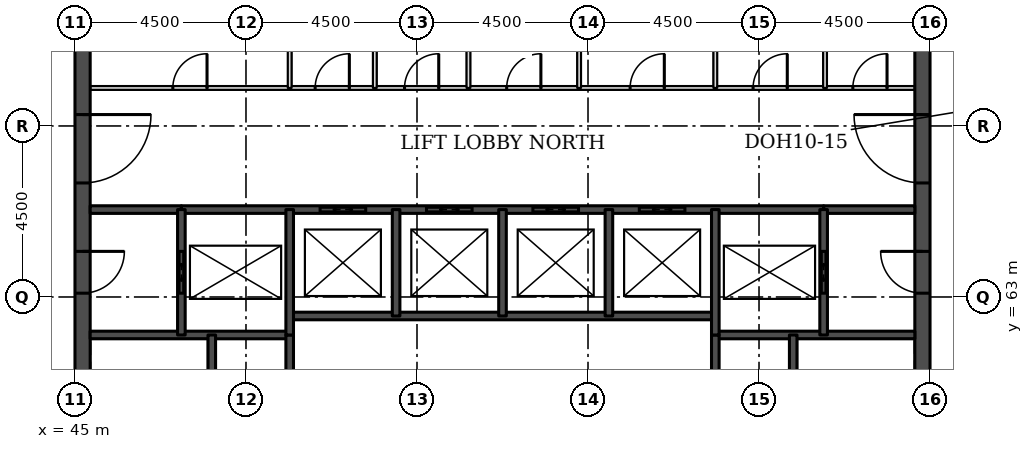
"""IFC4 building model, lengths in metres.
Left out: names, types, materials, properties, quantities, classifications, styles, units other than length and angle.
Written with IfcOpenShell. Run it as: python <this file> out.ifc"""

import sys

from ifc_helpers import new_model, si_unit, direction, frame, frame_2d, origin, place, context, subcontext, project, spatial, rectangle, extrude, element, fill, save


model = new_model("IFC4")
c1 = context("Model", 3, precision=1e-05, world=origin(), true_north=direction((0.0, 1.0)))
c2 = subcontext(c1, "Body", "Model", "MODEL_VIEW")
j1 = project(units=[si_unit("LENGTHUNIT", "METRE"), si_unit("PLANEANGLEUNIT", "RADIAN")], contexts=[c1])
p1 = place(None, origin())
s1 = spatial("IfcSite", under=j1, at=p1, CompositionType="ELEMENT")
p2 = place(p1, origin())
s2 = spatial("IfcBuilding", under=s1, at=p2, CompositionType="ELEMENT")
p3 = place(p2, frame((0.0, 0.0, 226.7)))
s3 = spatial("IfcBuildingStorey", under=s2, at=p3, CompositionType="ELEMENT", Elevation=226.7)
p4 = place(p3, frame((45.2, 49.5, 0.0), z_axis=(0.0, 0.0, 1.0), x_axis=(0.0, 1.0, 0.0)))
e1 = element("IfcWall", 1, at=p4, inside=s3, PredefinedType="SHEAR", context=c2, shape_type="SweptSolid", body=[
    extrude(rectangle(XDim=22.5, YDim=0.4, at=frame_2d((11.25, 0.0))), origin(), (0.0, 0.0, 1.0), 3.7),
])
p5 = place(p4, frame((4.2, 0.0, 0.0)))
e2 = element("IfcOpeningElement", 2, at=p5, cuts=e1, PredefinedType="OPENING", context=c2, shape_type="SweptSolid", body=[
    extrude(rectangle(XDim=1.8, YDim=2.1, at=frame_2d((0.9, 1.05))), frame((0.0, 0.21, 0.0), z_axis=(0.0, -1.0, 0.0), x_axis=(1.0, 0.0, 0.0)), (0.0, 0.0, 1.0), 0.42),
])
p6 = place(p4, frame((6.9, 0.0, 0.0)))
e3 = element("IfcOpeningElement", 3, at=p6, cuts=e1, PredefinedType="OPENING", context=c2, shape_type="SweptSolid", body=[
    extrude(rectangle(XDim=1.1, YDim=2.1, at=frame_2d((0.55, 1.05))), frame((0.0, 0.21, 0.0), z_axis=(0.0, -1.0, 0.0), x_axis=(1.0, 0.0, 0.0)), (0.0, 0.0, 1.0), 0.42),
])
p7 = place(p4, frame((13.6, 0.0, 0.0)))
e4 = element("IfcOpeningElement", 4, at=p7, cuts=e1, PredefinedType="OPENING", context=c2, shape_type="SweptSolid", body=[
    extrude(rectangle(XDim=1.1, YDim=2.1, at=frame_2d((0.55, 1.05))), frame((0.0, 0.21, 0.0), z_axis=(0.0, -1.0, 0.0), x_axis=(1.0, 0.0, 0.0)), (0.0, 0.0, 1.0), 0.42),
])
p8 = place(p4, frame((16.5, 0.0, 0.0)))
e5 = element("IfcOpeningElement", 5, at=p8, cuts=e1, PredefinedType="OPENING", context=c2, shape_type="SweptSolid", body=[
    extrude(rectangle(XDim=1.8, YDim=2.1, at=frame_2d((0.9, 1.05))), frame((0.0, 0.21, 0.0), z_axis=(0.0, -1.0, 0.0), x_axis=(1.0, 0.0, 0.0)), (0.0, 0.0, 1.0), 0.42),
])
p9 = place(p3, frame((67.3, 49.5, 0.0), z_axis=(0.0, 0.0, 1.0), x_axis=(0.0, 1.0, 0.0)))
e6 = element("IfcWall", 6, at=p9, inside=s3, PredefinedType="SHEAR", context=c2, shape_type="SweptSolid", body=[
    extrude(rectangle(XDim=22.5, YDim=0.4, at=frame_2d((11.25, 0.0))), origin(), (0.0, 0.0, 1.0), 3.7),
])
p10 = place(p9, frame((4.2, 0.0, 0.0)))
e7 = element("IfcOpeningElement", 7, at=p10, cuts=e6, PredefinedType="OPENING", context=c2, shape_type="SweptSolid", body=[
    extrude(rectangle(XDim=1.8, YDim=2.1, at=frame_2d((0.9, 1.05))), frame((0.0, 0.21, 0.0), z_axis=(0.0, -1.0, 0.0), x_axis=(1.0, 0.0, 0.0)), (0.0, 0.0, 1.0), 0.42),
])
p11 = place(p9, frame((6.9, 0.0, 0.0)))
e8 = element("IfcOpeningElement", 8, at=p11, cuts=e6, PredefinedType="OPENING", context=c2, shape_type="SweptSolid", body=[
    extrude(rectangle(XDim=1.1, YDim=2.1, at=frame_2d((0.55, 1.05))), frame((0.0, 0.21, 0.0), z_axis=(0.0, -1.0, 0.0), x_axis=(1.0, 0.0, 0.0)), (0.0, 0.0, 1.0), 0.42),
])
p12 = place(p9, frame((13.6, 0.0, 0.0)))
e9 = element("IfcOpeningElement", 9, at=p12, cuts=e6, PredefinedType="OPENING", context=c2, shape_type="SweptSolid", body=[
    extrude(rectangle(XDim=1.1, YDim=2.1, at=frame_2d((0.55, 1.05))), frame((0.0, 0.21, 0.0), z_axis=(0.0, -1.0, 0.0), x_axis=(1.0, 0.0, 0.0)), (0.0, 0.0, 1.0), 0.42),
])
p13 = place(p9, frame((16.5, 0.0, 0.0)))
e10 = element("IfcOpeningElement", 10, at=p13, cuts=e6, PredefinedType="OPENING", context=c2, shape_type="SweptSolid", body=[
    extrude(rectangle(XDim=1.8, YDim=2.1, at=frame_2d((0.9, 1.05))), frame((0.0, 0.21, 0.0), z_axis=(0.0, -1.0, 0.0), x_axis=(1.0, 0.0, 0.0)), (0.0, 0.0, 1.0), 0.42),
])
for number, where, z_axis, x_axis in (
    (11, (45.4, 62.0, 0.0), (0.0, 0.0, 1.0), (1.0, 0.0, 0.0)),
    (12, (61.85, 62.0, 0.0), (0.0, 0.0, 1.0), (1.0, 0.0, 0.0)),
):
    element("IfcWall", number, at=place(p3, frame(where, z_axis=z_axis, x_axis=x_axis)), inside=s3, PredefinedType="SOLIDWALL", context=c2, shape_type="SweptSolid", body=[
        extrude(rectangle(XDim=5.25, YDim=0.2, at=frame_2d((2.625, 0.0))), origin(), (0.0, 0.0, 1.0), 3.55),
    ])
p14 = place(p3, frame((50.65, 62.5, 0.0), z_axis=(0.0, 0.0, 1.0), x_axis=(1.0, 0.0, 0.0)))
e13 = element("IfcWall", 13, at=p14, inside=s3, PredefinedType="SOLIDWALL", context=c2, shape_type="SweptSolid", body=[
    extrude(rectangle(XDim=11.2, YDim=0.2, at=frame_2d((5.6, 0.0))), origin(), (0.0, 0.0, 1.0), 3.7),
])
for number, where, z_axis, x_axis in (
    (14, (45.4, 65.3, 0.0), (0.0, 0.0, 1.0), (1.0, 0.0, 0.0)),
    (15, (64.7, 65.3, 0.0), (0.0, 0.0, 1.0), (1.0, 0.0, 0.0)),
):
    element("IfcWall", number, at=place(p3, frame(where, z_axis=z_axis, x_axis=x_axis)), inside=s3, PredefinedType="SOLIDWALL", context=c2, shape_type="SweptSolid", body=[
        extrude(rectangle(XDim=2.4, YDim=0.2, at=frame_2d((1.2, 0.0))), origin(), (0.0, 0.0, 1.0), 3.55),
    ])
p15 = place(p3, frame((47.8, 65.3, 0.0), z_axis=(0.0, 0.0, 1.0), x_axis=(1.0, 0.0, 0.0)))
e16 = element("IfcWall", 16, at=p15, inside=s3, PredefinedType="SOLIDWALL", context=c2, shape_type="SweptSolid", body=[
    extrude(rectangle(XDim=16.9, YDim=0.2, at=frame_2d((8.45, 0.0))), origin(), (0.0, 0.0, 1.0), 3.55),
])
p16 = place(p15, frame((3.65, 0.0, 0.0)))
e17 = element("IfcOpeningElement", 17, at=p16, cuts=e16, PredefinedType="OPENING", context=c2, shape_type="SweptSolid", body=[
    extrude(rectangle(XDim=1.2, YDim=2.1, at=frame_2d((0.6, 1.05))), frame((0.0, 0.11, 0.0), z_axis=(0.0, -1.0, 0.0), x_axis=(1.0, 0.0, 0.0)), (0.0, 0.0, 1.0), 0.22),
])
p17 = place(p15, frame((6.45, 0.0, 0.0)))
e18 = element("IfcOpeningElement", 18, at=p17, cuts=e16, PredefinedType="OPENING", context=c2, shape_type="SweptSolid", body=[
    extrude(rectangle(XDim=1.2, YDim=2.1, at=frame_2d((0.6, 1.05))), frame((0.0, 0.11, 0.0), z_axis=(0.0, -1.0, 0.0), x_axis=(1.0, 0.0, 0.0)), (0.0, 0.0, 1.0), 0.22),
])
p18 = place(p15, frame((9.25, 0.0, 0.0)))
e19 = element("IfcOpeningElement", 19, at=p18, cuts=e16, PredefinedType="OPENING", context=c2, shape_type="SweptSolid", body=[
    extrude(rectangle(XDim=1.2, YDim=2.1, at=frame_2d((0.6, 1.05))), frame((0.0, 0.11, 0.0), z_axis=(0.0, -1.0, 0.0), x_axis=(1.0, 0.0, 0.0)), (0.0, 0.0, 1.0), 0.22),
])
p19 = place(p15, frame((12.05, 0.0, 0.0)))
e20 = element("IfcOpeningElement", 20, at=p19, cuts=e16, PredefinedType="OPENING", context=c2, shape_type="SweptSolid", body=[
    extrude(rectangle(XDim=1.2, YDim=2.1, at=frame_2d((0.6, 1.05))), frame((0.0, 0.11, 0.0), z_axis=(0.0, -1.0, 0.0), x_axis=(1.0, 0.0, 0.0)), (0.0, 0.0, 1.0), 0.22),
])
p20 = place(p3, frame((45.4, 68.5, 0.0), z_axis=(0.0, 0.0, 1.0), x_axis=(1.0, 0.0, 0.0)))
e21 = element("IfcWall", 21, at=p20, inside=s3, PredefinedType="PARTITIONING", context=c2, shape_type="SweptSolid", body=[
    extrude(rectangle(XDim=21.7, YDim=0.1, at=frame_2d((10.85, 0.0))), origin(), (0.0, 0.0, 1.0), 3.55),
])
p21 = place(p20, frame((20.069, 0.0, 0.0)))
e22 = element("IfcOpeningElement", 22, at=p21, cuts=e21, PredefinedType="OPENING", context=c2, shape_type="SweptSolid", body=[
    extrude(rectangle(XDim=0.9, YDim=2.1, at=frame_2d((0.45, 1.05))), frame((0.0, 0.06, 0.0), z_axis=(0.0, -1.0, 0.0), x_axis=(1.0, 0.0, 0.0)), (0.0, 0.0, 1.0), 0.12),
])
p22 = place(p20, frame((17.444, 0.0, 0.0)))
e23 = element("IfcOpeningElement", 23, at=p22, cuts=e21, PredefinedType="OPENING", context=c2, shape_type="SweptSolid", body=[
    extrude(rectangle(XDim=0.9, YDim=2.1, at=frame_2d((0.45, 1.05))), frame((0.0, 0.06, 0.0), z_axis=(0.0, -1.0, 0.0), x_axis=(1.0, 0.0, 0.0)), (0.0, 0.0, 1.0), 0.12),
])
p23 = place(p20, frame((2.175, 0.0, 0.0)))
e24 = element("IfcOpeningElement", 24, at=p23, cuts=e21, PredefinedType="OPENING", context=c2, shape_type="SweptSolid", body=[
    extrude(rectangle(XDim=0.9, YDim=2.1, at=frame_2d((0.45, 1.05))), frame((0.0, 0.06, 0.0), z_axis=(0.0, -1.0, 0.0), x_axis=(1.0, 0.0, 0.0)), (0.0, 0.0, 1.0), 0.12),
])
p24 = place(p20, frame((14.208, 0.0, 0.0)))
e25 = element("IfcOpeningElement", 25, at=p24, cuts=e21, PredefinedType="OPENING", context=c2, shape_type="SweptSolid", body=[
    extrude(rectangle(XDim=0.9, YDim=2.1, at=frame_2d((0.45, 1.05))), frame((0.0, 0.06, 0.0), z_axis=(0.0, -1.0, 0.0), x_axis=(1.0, 0.0, 0.0)), (0.0, 0.0, 1.0), 0.12),
])
p25 = place(p20, frame((10.96, 0.0, 0.0)))
e26 = element("IfcOpeningElement", 26, at=p25, cuts=e21, PredefinedType="OPENING", context=c2, shape_type="SweptSolid", body=[
    extrude(rectangle(XDim=0.9, YDim=2.1, at=frame_2d((0.45, 1.05))), frame((0.0, 0.06, 0.0), z_axis=(0.0, -1.0, 0.0), x_axis=(1.0, 0.0, 0.0)), (0.0, 0.0, 1.0), 0.12),
])
p26 = place(p20, frame((8.272, 0.0, 0.0)))
e27 = element("IfcOpeningElement", 27, at=p26, cuts=e21, PredefinedType="OPENING", context=c2, shape_type="SweptSolid", body=[
    extrude(rectangle(XDim=0.9, YDim=2.1, at=frame_2d((0.45, 1.05))), frame((0.0, 0.06, 0.0), z_axis=(0.0, -1.0, 0.0), x_axis=(1.0, 0.0, 0.0)), (0.0, 0.0, 1.0), 0.12),
])
p27 = place(p20, frame((5.92, 0.0, 0.0)))
e28 = element("IfcOpeningElement", 28, at=p27, cuts=e21, PredefinedType="OPENING", context=c2, shape_type="SweptSolid", body=[
    extrude(rectangle(XDim=0.9, YDim=2.1, at=frame_2d((0.45, 1.05))), frame((0.0, 0.06, 0.0), z_axis=(0.0, -1.0, 0.0), x_axis=(1.0, 0.0, 0.0)), (0.0, 0.0, 1.0), 0.12),
])
p28 = place(p3, frame((47.8, 62.0, 0.0), z_axis=(0.0, 0.0, 1.0), x_axis=(0.0, 1.0, 0.0)))
e29 = element("IfcWall", 29, at=p28, inside=s3, PredefinedType="SOLIDWALL", context=c2, shape_type="SweptSolid", body=[
    extrude(rectangle(XDim=3.3, YDim=0.2, at=frame_2d((1.65, 0.0))), origin(), (0.0, 0.0, 1.0), 3.55),
])
p29 = place(p28, frame((1.1, 0.0, 0.0)))
e30 = element("IfcOpeningElement", 30, at=p29, cuts=e29, PredefinedType="OPENING", context=c2, shape_type="SweptSolid", body=[
    extrude(rectangle(XDim=1.1, YDim=2.1, at=frame_2d((0.55, 1.05))), frame((0.0, 0.11, 0.0), z_axis=(0.0, -1.0, 0.0), x_axis=(1.0, 0.0, 0.0)), (0.0, 0.0, 1.0), 0.22),
])
p30 = place(p3, frame((48.6, 56.2, 0.0), z_axis=(0.0, 0.0, 1.0), x_axis=(0.0, 1.0, 0.0)))
e31 = element("IfcWall", 31, at=p30, inside=s3, PredefinedType="SOLIDWALL", context=c2, shape_type="SweptSolid", body=[
    extrude(rectangle(XDim=5.8, YDim=0.2, at=frame_2d((2.9, 0.0))), origin(), (0.0, 0.0, 1.0), 3.55),
])
p31 = place(p3, frame((50.65, 68.5, 0.0), z_axis=(0.0, 0.0, 1.0), x_axis=(0.0, 1.0, 0.0)))
e32 = element("IfcWall", 32, at=p31, inside=s3, PredefinedType="PARTITIONING", context=c2, shape_type="SweptSolid", body=[
    extrude(rectangle(XDim=3.1, YDim=0.1, at=frame_2d((1.55, 0.0))), origin(), (0.0, 0.0, 1.0), 3.55),
])
p32 = place(p3, frame((50.65, 59.0, 0.0), z_axis=(0.0, 0.0, 1.0), x_axis=(0.0, 1.0, 0.0)))
e33 = element("IfcWall", 33, at=p32, inside=s3, PredefinedType="SOLIDWALL", context=c2, shape_type="SweptSolid", body=[
    extrude(rectangle(XDim=3.0, YDim=0.2, at=frame_2d((1.5, 0.0))), origin(), (0.0, 0.0, 1.0), 3.7),
])
p33 = place(p3, frame((50.65, 62.0, 0.0), z_axis=(0.0, 0.0, 1.0), x_axis=(0.0, 1.0, 0.0)))
e34 = element("IfcWall", 34, at=p33, inside=s3, PredefinedType="SOLIDWALL", context=c2, shape_type="SweptSolid", body=[
    extrude(rectangle(XDim=3.3, YDim=0.2, at=frame_2d((1.65, 0.0))), origin(), (0.0, 0.0, 1.0), 3.55),
])
p34 = place(p3, frame((52.89, 68.5, 0.0), z_axis=(0.0, 0.0, 1.0), x_axis=(0.0, 1.0, 0.0)))
e35 = element("IfcWall", 35, at=p34, inside=s3, PredefinedType="PARTITIONING", context=c2, shape_type="SweptSolid", body=[
    extrude(rectangle(XDim=3.1, YDim=0.1, at=frame_2d((1.55, 0.0))), origin(), (0.0, 0.0, 1.0), 3.55),
])
p35 = place(p3, frame((53.45, 62.5, 0.0), z_axis=(0.0, 0.0, 1.0), x_axis=(0.0, 1.0, 0.0)))
e36 = element("IfcWall", 36, at=p35, inside=s3, PredefinedType="SOLIDWALL", context=c2, shape_type="SweptSolid", body=[
    extrude(rectangle(XDim=2.8, YDim=0.2, at=frame_2d((1.4, 0.0))), origin(), (0.0, 0.0, 1.0), 3.55),
])
p36 = place(p3, frame((55.354, 68.5, 0.0), z_axis=(0.0, 0.0, 1.0), x_axis=(0.0, 1.0, 0.0)))
e37 = element("IfcWall", 37, at=p36, inside=s3, PredefinedType="PARTITIONING", context=c2, shape_type="SweptSolid", body=[
    extrude(rectangle(XDim=3.1, YDim=0.1, at=frame_2d((1.55, 0.0))), origin(), (0.0, 0.0, 1.0), 3.55),
])
p37 = place(p3, frame((56.25, 62.5, 0.0), z_axis=(0.0, 0.0, 1.0), x_axis=(0.0, 1.0, 0.0)))
e38 = element("IfcWall", 38, at=p37, inside=s3, PredefinedType="SOLIDWALL", context=c2, shape_type="SweptSolid", body=[
    extrude(rectangle(XDim=2.8, YDim=0.2, at=frame_2d((1.4, 0.0))), origin(), (0.0, 0.0, 1.0), 3.55),
])
p38 = place(p3, frame((58.266, 68.5, 0.0), z_axis=(0.0, 0.0, 1.0), x_axis=(0.0, 1.0, 0.0)))
e39 = element("IfcWall", 39, at=p38, inside=s3, PredefinedType="PARTITIONING", context=c2, shape_type="SweptSolid", body=[
    extrude(rectangle(XDim=3.1, YDim=0.1, at=frame_2d((1.55, 0.0))), origin(), (0.0, 0.0, 1.0), 3.55),
])
p39 = place(p3, frame((59.05, 62.5, 0.0), z_axis=(0.0, 0.0, 1.0), x_axis=(0.0, 1.0, 0.0)))
e40 = element("IfcWall", 40, at=p39, inside=s3, PredefinedType="SOLIDWALL", context=c2, shape_type="SweptSolid", body=[
    extrude(rectangle(XDim=2.8, YDim=0.2, at=frame_2d((1.4, 0.0))), origin(), (0.0, 0.0, 1.0), 3.55),
])
p40 = place(p3, frame((61.85, 68.5, 0.0), z_axis=(0.0, 0.0, 1.0), x_axis=(0.0, 1.0, 0.0)))
e41 = element("IfcWall", 41, at=p40, inside=s3, PredefinedType="PARTITIONING", context=c2, shape_type="SweptSolid", body=[
    extrude(rectangle(XDim=3.1, YDim=0.1, at=frame_2d((1.55, 0.0))), origin(), (0.0, 0.0, 1.0), 3.55),
])
p41 = place(p3, frame((61.85, 59.0, 0.0), z_axis=(0.0, 0.0, 1.0), x_axis=(0.0, 1.0, 0.0)))
e42 = element("IfcWall", 42, at=p41, inside=s3, PredefinedType="SOLIDWALL", context=c2, shape_type="SweptSolid", body=[
    extrude(rectangle(XDim=3.0, YDim=0.2, at=frame_2d((1.5, 0.0))), origin(), (0.0, 0.0, 1.0), 3.7),
])
p42 = place(p3, frame((61.85, 62.0, 0.0), z_axis=(0.0, 0.0, 1.0), x_axis=(0.0, 1.0, 0.0)))
e43 = element("IfcWall", 43, at=p42, inside=s3, PredefinedType="SOLIDWALL", context=c2, shape_type="SweptSolid", body=[
    extrude(rectangle(XDim=3.3, YDim=0.2, at=frame_2d((1.65, 0.0))), origin(), (0.0, 0.0, 1.0), 3.55),
])
p43 = place(p3, frame((63.9, 56.2, 0.0), z_axis=(0.0, 0.0, 1.0), x_axis=(0.0, 1.0, 0.0)))
e44 = element("IfcWall", 44, at=p43, inside=s3, PredefinedType="SOLIDWALL", context=c2, shape_type="SweptSolid", body=[
    extrude(rectangle(XDim=5.8, YDim=0.2, at=frame_2d((2.9, 0.0))), origin(), (0.0, 0.0, 1.0), 3.55),
])
p44 = place(p3, frame((64.7, 62.0, 0.0), z_axis=(0.0, 0.0, 1.0), x_axis=(0.0, 1.0, 0.0)))
e45 = element("IfcWall", 45, at=p44, inside=s3, PredefinedType="SOLIDWALL", context=c2, shape_type="SweptSolid", body=[
    extrude(rectangle(XDim=3.3, YDim=0.2, at=frame_2d((1.65, 0.0))), origin(), (0.0, 0.0, 1.0), 3.55),
])
p45 = place(p44, frame((1.1, 0.0, 0.0)))
e46 = element("IfcOpeningElement", 46, at=p45, cuts=e45, PredefinedType="OPENING", context=c2, shape_type="SweptSolid", body=[
    extrude(rectangle(XDim=1.1, YDim=2.1, at=frame_2d((0.55, 1.05))), frame((0.0, 0.11, 0.0), z_axis=(0.0, -1.0, 0.0), x_axis=(1.0, 0.0, 0.0)), (0.0, 0.0, 1.0), 0.22),
])
p46 = place(p3, frame((64.738, 68.5, 0.0), z_axis=(0.0, 0.0, 1.0), x_axis=(0.0, 1.0, 0.0)))
e47 = element("IfcWall", 47, at=p46, inside=s3, PredefinedType="PARTITIONING", context=c2, shape_type="SweptSolid", body=[
    extrude(rectangle(XDim=3.1, YDim=0.1, at=frame_2d((1.55, 0.0))), origin(), (0.0, 0.0, 1.0), 3.55),
])
p47 = place(p16, origin())
e48 = element("IfcDoor", 48, at=p47, inside=s3, OperationType="DOUBLE_DOOR_SLIDING", PredefinedType="DOOR", context=c2, shape_type="SweptSolid", body=[
    extrude(rectangle(XDim=1.2, YDim=2.1, at=frame_2d((0.6, 1.05))), frame((0.0, 0.025, 0.0), z_axis=(0.0, -1.0, 0.0), x_axis=(1.0, 0.0, 0.0)), (0.0, 0.0, 1.0), 0.05),
])
fill(e17, e48)
p48 = place(p17, origin())
e49 = element("IfcDoor", 49, at=p48, inside=s3, OperationType="DOUBLE_DOOR_SLIDING", PredefinedType="DOOR", context=c2, shape_type="SweptSolid", body=[
    extrude(rectangle(XDim=1.2, YDim=2.1, at=frame_2d((0.6, 1.05))), frame((0.0, 0.025, 0.0), z_axis=(0.0, -1.0, 0.0), x_axis=(1.0, 0.0, 0.0)), (0.0, 0.0, 1.0), 0.05),
])
fill(e18, e49)
p49 = place(p18, origin())
e50 = element("IfcDoor", 50, at=p49, inside=s3, OperationType="DOUBLE_DOOR_SLIDING", PredefinedType="DOOR", context=c2, shape_type="SweptSolid", body=[
    extrude(rectangle(XDim=1.2, YDim=2.1, at=frame_2d((0.6, 1.05))), frame((0.0, 0.025, 0.0), z_axis=(0.0, -1.0, 0.0), x_axis=(1.0, 0.0, 0.0)), (0.0, 0.0, 1.0), 0.05),
])
fill(e19, e50)
p50 = place(p19, origin())
e51 = element("IfcDoor", 51, at=p50, inside=s3, OperationType="DOUBLE_DOOR_SLIDING", PredefinedType="DOOR", context=c2, shape_type="SweptSolid", body=[
    extrude(rectangle(XDim=1.2, YDim=2.1, at=frame_2d((0.6, 1.05))), frame((0.0, 0.025, 0.0), z_axis=(0.0, -1.0, 0.0), x_axis=(1.0, 0.0, 0.0)), (0.0, 0.0, 1.0), 0.05),
])
fill(e20, e51)
p51 = place(p29, origin())
e52 = element("IfcDoor", 52, at=p51, inside=s3, OperationType="DOUBLE_DOOR_SLIDING", PredefinedType="DOOR", context=c2, shape_type="SweptSolid", body=[
    extrude(rectangle(XDim=1.1, YDim=2.1, at=frame_2d((0.55, 1.05))), frame((0.0, 0.025, 0.0), z_axis=(0.0, -1.0, 0.0), x_axis=(1.0, 0.0, 0.0)), (0.0, 0.0, 1.0), 0.05),
])
fill(e30, e52)
p52 = place(p45, origin())
e53 = element("IfcDoor", 53, at=p52, inside=s3, OperationType="DOUBLE_DOOR_SLIDING", PredefinedType="DOOR", context=c2, shape_type="SweptSolid", body=[
    extrude(rectangle(XDim=1.1, YDim=2.1, at=frame_2d((0.55, 1.05))), frame((0.0, 0.025, 0.0), z_axis=(0.0, -1.0, 0.0), x_axis=(1.0, 0.0, 0.0)), (0.0, 0.0, 1.0), 0.05),
])
fill(e46, e53)
p53 = place(p7, frame((1.1, 0.0, 0.0), z_axis=(0.0, 0.0, 1.0), x_axis=(-1.0, 0.0, 0.0)))
e54 = element("IfcDoor", 54, at=p53, inside=s3, OperationType="SINGLE_SWING_LEFT", PredefinedType="DOOR", context=c2, shape_type="SweptSolid", body=[
    extrude(rectangle(XDim=1.1, YDim=2.1, at=frame_2d((0.55, 1.05))), frame((0.0, 0.025, 0.0), z_axis=(0.0, -1.0, 0.0), x_axis=(1.0, 0.0, 0.0)), (0.0, 0.0, 1.0), 0.05),
])
fill(e4, e54)
p54 = place(p8, frame((1.8, 0.0, 0.0), z_axis=(0.0, 0.0, 1.0), x_axis=(-1.0, 0.0, 0.0)))
e55 = element("IfcDoor", 55, at=p54, inside=s3, OperationType="SINGLE_SWING_LEFT", PredefinedType="DOOR", context=c2, shape_type="SweptSolid", body=[
    extrude(rectangle(XDim=1.8, YDim=2.1, at=frame_2d((0.9, 1.05))), frame((0.0, 0.025, 0.0), z_axis=(0.0, -1.0, 0.0), x_axis=(1.0, 0.0, 0.0)), (0.0, 0.0, 1.0), 0.05),
])
fill(e5, e55)
p55 = place(p12, origin())
e56 = element("IfcDoor", 56, at=p55, inside=s3, OperationType="SINGLE_SWING_RIGHT", PredefinedType="DOOR", context=c2, shape_type="SweptSolid", body=[
    extrude(rectangle(XDim=1.1, YDim=2.1, at=frame_2d((0.55, 1.05))), frame((0.0, 0.025, 0.0), z_axis=(0.0, -1.0, 0.0), x_axis=(1.0, 0.0, 0.0)), (0.0, 0.0, 1.0), 0.05),
])
fill(e9, e56)
p56 = place(p13, origin())
e57 = element("IfcDoor", 57, at=p56, inside=s3, OperationType="SINGLE_SWING_RIGHT", PredefinedType="DOOR", context=c2, shape_type="SweptSolid", body=[
    extrude(rectangle(XDim=1.8, YDim=2.1, at=frame_2d((0.9, 1.05))), frame((0.0, 0.025, 0.0), z_axis=(0.0, -1.0, 0.0), x_axis=(1.0, 0.0, 0.0)), (0.0, 0.0, 1.0), 0.05),
])
fill(e10, e57)
p57 = place(p21, origin())
e58 = element("IfcDoor", 58, at=p57, inside=s3, OperationType="SINGLE_SWING_RIGHT", PredefinedType="DOOR", context=c2, shape_type="SweptSolid", body=[
    extrude(rectangle(XDim=0.9, YDim=2.1, at=frame_2d((0.45, 1.05))), frame((0.0, 0.025, 0.0), z_axis=(0.0, -1.0, 0.0), x_axis=(1.0, 0.0, 0.0)), (0.0, 0.0, 1.0), 0.05),
])
fill(e22, e58)
p58 = place(p22, origin())
e59 = element("IfcDoor", 59, at=p58, inside=s3, OperationType="SINGLE_SWING_RIGHT", PredefinedType="DOOR", context=c2, shape_type="SweptSolid", body=[
    extrude(rectangle(XDim=0.9, YDim=2.1, at=frame_2d((0.45, 1.05))), frame((0.0, 0.025, 0.0), z_axis=(0.0, -1.0, 0.0), x_axis=(1.0, 0.0, 0.0)), (0.0, 0.0, 1.0), 0.05),
])
fill(e23, e59)
p59 = place(p23, origin())
e60 = element("IfcDoor", 60, at=p59, inside=s3, OperationType="SINGLE_SWING_RIGHT", PredefinedType="DOOR", context=c2, shape_type="SweptSolid", body=[
    extrude(rectangle(XDim=0.9, YDim=2.1, at=frame_2d((0.45, 1.05))), frame((0.0, 0.025, 0.0), z_axis=(0.0, -1.0, 0.0), x_axis=(1.0, 0.0, 0.0)), (0.0, 0.0, 1.0), 0.05),
])
fill(e24, e60)
p60 = place(p24, origin())
e61 = element("IfcDoor", 61, at=p60, inside=s3, OperationType="SINGLE_SWING_RIGHT", PredefinedType="DOOR", context=c2, shape_type="SweptSolid", body=[
    extrude(rectangle(XDim=0.9, YDim=2.1, at=frame_2d((0.45, 1.05))), frame((0.0, 0.025, 0.0), z_axis=(0.0, -1.0, 0.0), x_axis=(1.0, 0.0, 0.0)), (0.0, 0.0, 1.0), 0.05),
])
fill(e25, e61)
p61 = place(p25, origin())
e62 = element("IfcDoor", 62, at=p61, inside=s3, OperationType="SINGLE_SWING_RIGHT", PredefinedType="DOOR", context=c2, shape_type="SweptSolid", body=[
    extrude(rectangle(XDim=0.9, YDim=2.1, at=frame_2d((0.45, 1.05))), frame((0.0, 0.025, 0.0), z_axis=(0.0, -1.0, 0.0), x_axis=(1.0, 0.0, 0.0)), (0.0, 0.0, 1.0), 0.05),
])
fill(e26, e62)
p62 = place(p26, origin())
e63 = element("IfcDoor", 63, at=p62, inside=s3, OperationType="SINGLE_SWING_RIGHT", PredefinedType="DOOR", context=c2, shape_type="SweptSolid", body=[
    extrude(rectangle(XDim=0.9, YDim=2.1, at=frame_2d((0.45, 1.05))), frame((0.0, 0.025, 0.0), z_axis=(0.0, -1.0, 0.0), x_axis=(1.0, 0.0, 0.0)), (0.0, 0.0, 1.0), 0.05),
])
fill(e27, e63)
p63 = place(p27, origin())
e64 = element("IfcDoor", 64, at=p63, inside=s3, OperationType="SINGLE_SWING_RIGHT", PredefinedType="DOOR", context=c2, shape_type="SweptSolid", body=[
    extrude(rectangle(XDim=0.9, YDim=2.1, at=frame_2d((0.45, 1.05))), frame((0.0, 0.025, 0.0), z_axis=(0.0, -1.0, 0.0), x_axis=(1.0, 0.0, 0.0)), (0.0, 0.0, 1.0), 0.05),
])
fill(e28, e64)
save(model, sys.argv[1])
